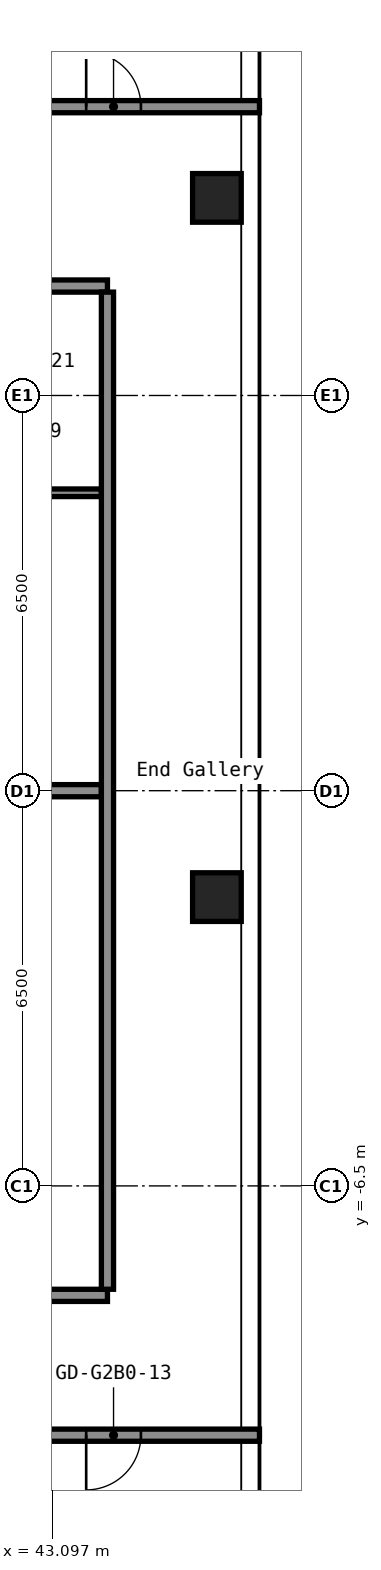
"""IFC4 building model, lengths in metres.
Left out: names, types, materials, properties, quantities, classifications, styles, units other than length and angle.
Written with IfcOpenShell. Run it as: python <this file> out.ifc"""

import sys

from ifc_helpers import new_model, si_unit, direction, frame, frame_2d, origin, origin_2d, place, context, subcontext, project, spatial, rectangle, hollow_rectangle, extrude, element, fill, save


model = new_model("IFC4")
c1 = context("Model", 3, precision=1e-05, world=origin(), true_north=direction((0.0, 1.0)))
c2 = subcontext(c1, "Body", "Model", "MODEL_VIEW")
j1 = project(units=[si_unit("LENGTHUNIT", "METRE"), si_unit("PLANEANGLEUNIT", "RADIAN")], contexts=[c1])
p1 = place(None, origin())
s1 = spatial("IfcSite", under=j1, at=p1, CompositionType="ELEMENT")
p2 = place(p1, origin())
s2 = spatial("IfcBuilding", under=s1, at=p2, CompositionType="ELEMENT")
p3 = place(p2, frame((0.0, 0.0, 78.6)))
s3 = spatial("IfcBuildingStorey", under=s2, at=p3, CompositionType="ELEMENT", Elevation=78.6)
for number, where, z_axis, x_axis in (
    (1, (45.8, -1.75, 0.0), (0.0, 0.0, 1.0), (1.0, 0.0, 0.0)),
    (2, (45.8, 9.75, 0.0), (0.0, 0.0, 1.0), (1.0, 0.0, 0.0)),
):
    element("IfcColumn", number, at=place(p3, frame(where, z_axis=z_axis, x_axis=x_axis)), inside=s3, PredefinedType="COLUMN", context=c2, shape_type="SweptSolid", body=[
        extrude(hollow_rectangle(XDim=0.8, YDim=0.8, WallThickness=0.032, at=origin_2d()), origin(), (0.0, 0.0, 1.0), 2.8),
    ])
p4 = place(p3, frame((16.8, -10.6, 0.0), z_axis=(0.0, 0.0, 1.0), x_axis=(1.0, 0.0, 0.0)))
e3 = element("IfcWall", 3, at=p4, inside=s3, PredefinedType="PARTITIONING", context=c2, shape_type="SweptSolid", body=[
    extrude(rectangle(XDim=29.7, YDim=0.2, at=frame_2d((14.85, 0.0))), origin(), (0.0, 0.0, 1.0), 2.8),
])
p5 = place(p4, frame((2.155, 0.0, 0.0)))
e4 = element("IfcOpeningElement", 4, at=p5, cuts=e3, PredefinedType="OPENING", context=c2, shape_type="SweptSolid", body=[
    extrude(rectangle(XDim=0.9, YDim=2.1, at=frame_2d((0.45, 1.05))), frame((0.0, 0.11, 0.0), z_axis=(0.0, -1.0, 0.0), x_axis=(1.0, 0.0, 0.0)), (0.0, 0.0, 1.0), 0.22),
])
p6 = place(p4, frame((6.355, 0.0, 0.0)))
e5 = element("IfcOpeningElement", 5, at=p6, cuts=e3, PredefinedType="OPENING", context=c2, shape_type="SweptSolid", body=[
    extrude(rectangle(XDim=0.9, YDim=2.1, at=frame_2d((0.45, 1.05))), frame((0.0, 0.11, 0.0), z_axis=(0.0, -1.0, 0.0), x_axis=(1.0, 0.0, 0.0)), (0.0, 0.0, 1.0), 0.22),
])
p7 = place(p4, frame((10.385, 0.0, 0.0)))
e6 = element("IfcOpeningElement", 6, at=p7, cuts=e3, PredefinedType="OPENING", context=c2, shape_type="SweptSolid", body=[
    extrude(rectangle(XDim=0.9, YDim=2.1, at=frame_2d((0.45, 1.05))), frame((0.0, 0.11, 0.0), z_axis=(0.0, -1.0, 0.0), x_axis=(1.0, 0.0, 0.0)), (0.0, 0.0, 1.0), 0.22),
])
p8 = place(p4, frame((14.585, 0.0, 0.0)))
e7 = element("IfcOpeningElement", 7, at=p8, cuts=e3, PredefinedType="OPENING", context=c2, shape_type="SweptSolid", body=[
    extrude(rectangle(XDim=0.9, YDim=2.1, at=frame_2d((0.45, 1.05))), frame((0.0, 0.11, 0.0), z_axis=(0.0, -1.0, 0.0), x_axis=(1.0, 0.0, 0.0)), (0.0, 0.0, 1.0), 0.22),
])
p9 = place(p4, frame((18.7, 0.0, 0.0)))
e8 = element("IfcOpeningElement", 8, at=p9, cuts=e3, PredefinedType="OPENING", context=c2, shape_type="SweptSolid", body=[
    extrude(rectangle(XDim=0.9, YDim=2.1, at=frame_2d((0.45, 1.05))), frame((0.0, 0.11, 0.0), z_axis=(0.0, -1.0, 0.0), x_axis=(1.0, 0.0, 0.0)), (0.0, 0.0, 1.0), 0.22),
])
p10 = place(p4, frame((22.9, 0.0, 0.0)))
e9 = element("IfcOpeningElement", 9, at=p10, cuts=e3, PredefinedType="OPENING", context=c2, shape_type="SweptSolid", body=[
    extrude(rectangle(XDim=0.9, YDim=2.1, at=frame_2d((0.45, 1.05))), frame((0.0, 0.11, 0.0), z_axis=(0.0, -1.0, 0.0), x_axis=(1.0, 0.0, 0.0)), (0.0, 0.0, 1.0), 0.22),
])
p11 = place(p4, frame((26.85, 0.0, 0.0)))
e10 = element("IfcOpeningElement", 10, at=p11, cuts=e3, PredefinedType="OPENING", context=c2, shape_type="SweptSolid", body=[
    extrude(rectangle(XDim=0.9, YDim=2.1, at=frame_2d((0.45, 1.05))), frame((0.0, 0.11, 0.0), z_axis=(0.0, -1.0, 0.0), x_axis=(1.0, 0.0, 0.0)), (0.0, 0.0, 1.0), 0.22),
])
p12 = place(p3, frame((33.6, -8.3, 0.0), z_axis=(0.0, 0.0, 1.0), x_axis=(1.0, 0.0, 0.0)))
e11 = element("IfcWall", 11, at=p12, inside=s3, PredefinedType="PARTITIONING", context=c2, shape_type="SweptSolid", body=[
    extrude(rectangle(XDim=10.4, YDim=0.2, at=frame_2d((5.2, 0.0))), origin(), (0.0, 0.0, 1.0), 2.8),
])
p13 = place(p12, frame((6.35, 0.0, 0.0)))
e12 = element("IfcOpeningElement", 12, at=p13, cuts=e11, PredefinedType="OPENING", context=c2, shape_type="SweptSolid", body=[
    extrude(rectangle(XDim=1.0, YDim=2.1, at=frame_2d((0.5, 1.05))), frame((0.0, 0.11, 0.0), z_axis=(0.0, -1.0, 0.0), x_axis=(1.0, 0.0, 0.0)), (0.0, 0.0, 1.0), 0.22),
])
p14 = place(p3, frame((33.6, 0.0, 0.0), z_axis=(0.0, 0.0, 1.0), x_axis=(1.0, 0.0, 0.0)))
e13 = element("IfcWall", 13, at=p14, inside=s3, PredefinedType="PARTITIONING", context=c2, shape_type="SweptSolid", body=[
    extrude(rectangle(XDim=10.3, YDim=0.2, at=frame_2d((5.15, 0.0))), origin(), (0.0, 0.0, 1.0), 2.8),
])
p15 = place(p3, frame((40.663, 4.9, 0.0), z_axis=(0.0, 0.0, 1.0), x_axis=(1.0, 0.0, 0.0)))
e14 = element("IfcWall", 14, at=p15, inside=s3, PredefinedType="PARTITIONING", context=c2, shape_type="SweptSolid", body=[
    extrude(rectangle(XDim=3.237, YDim=0.125, at=frame_2d((1.619, 0.0))), origin(), (0.0, 0.0, 1.0), 2.8),
])
p16 = place(p15, frame((1.238, 0.0, 0.0)))
e15 = element("IfcOpeningElement", 15, at=p16, cuts=e14, PredefinedType="OPENING", context=c2, shape_type="SweptSolid", body=[
    extrude(rectangle(XDim=0.8, YDim=2.1, at=frame_2d((0.4, 1.05))), frame((0.0, 0.073, 0.0), z_axis=(0.0, -1.0, 0.0), x_axis=(1.0, 0.0, 0.0)), (0.0, 0.0, 1.0), 0.145),
])
p17 = place(p3, frame((33.6, 8.3, 0.0), z_axis=(0.0, 0.0, 1.0), x_axis=(1.0, 0.0, 0.0)))
e16 = element("IfcWall", 16, at=p17, inside=s3, PredefinedType="PARTITIONING", context=c2, shape_type="SweptSolid", body=[
    extrude(rectangle(XDim=10.4, YDim=0.2, at=frame_2d((5.2, 0.0))), origin(), (0.0, 0.0, 1.0), 2.8),
])
p18 = place(p17, frame((3.05, 0.0, 0.0)))
e17 = element("IfcOpeningElement", 17, at=p18, cuts=e16, PredefinedType="OPENING", context=c2, shape_type="SweptSolid", body=[
    extrude(rectangle(XDim=1.0, YDim=2.1, at=frame_2d((0.5, 1.05))), frame((0.0, 0.11, 0.0), z_axis=(0.0, -1.0, 0.0), x_axis=(1.0, 0.0, 0.0)), (0.0, 0.0, 1.0), 0.22),
])
p19 = place(p3, frame((16.8, 11.25, 0.0), z_axis=(0.0, 0.0, 1.0), x_axis=(1.0, 0.0, 0.0)))
e18 = element("IfcWall", 18, at=p19, inside=s3, PredefinedType="PARTITIONING", context=c2, shape_type="SweptSolid", body=[
    extrude(rectangle(XDim=29.7, YDim=0.2, at=frame_2d((14.85, 0.0))), origin(), (0.0, 0.0, 1.0), 2.8),
])
p20 = place(p19, frame((3.4, 0.0, 0.0)))
e19 = element("IfcOpeningElement", 19, at=p20, cuts=e18, PredefinedType="OPENING", context=c2, shape_type="SweptSolid", body=[
    extrude(rectangle(XDim=1.6, YDim=2.1, at=frame_2d((0.8, 1.05))), frame((0.0, 0.11, 0.0), z_axis=(0.0, -1.0, 0.0), x_axis=(1.0, 0.0, 0.0)), (0.0, 0.0, 1.0), 0.22),
])
p21 = place(p19, frame((11.8, 0.0, 0.0)))
e20 = element("IfcOpeningElement", 20, at=p21, cuts=e18, PredefinedType="OPENING", context=c2, shape_type="SweptSolid", body=[
    extrude(rectangle(XDim=1.6, YDim=2.1, at=frame_2d((0.8, 1.05))), frame((0.0, 0.11, 0.0), z_axis=(0.0, -1.0, 0.0), x_axis=(1.0, 0.0, 0.0)), (0.0, 0.0, 1.0), 0.22),
])
p22 = place(p19, frame((20.2, 0.0, 0.0)))
e21 = element("IfcOpeningElement", 21, at=p22, cuts=e18, PredefinedType="OPENING", context=c2, shape_type="SweptSolid", body=[
    extrude(rectangle(XDim=1.6, YDim=2.1, at=frame_2d((0.8, 1.05))), frame((0.0, 0.11, 0.0), z_axis=(0.0, -1.0, 0.0), x_axis=(1.0, 0.0, 0.0)), (0.0, 0.0, 1.0), 0.22),
])
p23 = place(p19, frame((26.85, 0.0, 0.0)))
e22 = element("IfcOpeningElement", 22, at=p23, cuts=e18, PredefinedType="OPENING", context=c2, shape_type="SweptSolid", body=[
    extrude(rectangle(XDim=0.9, YDim=2.1, at=frame_2d((0.45, 1.05))), frame((0.0, 0.11, 0.0), z_axis=(0.0, -1.0, 0.0), x_axis=(1.0, 0.0, 0.0)), (0.0, 0.0, 1.0), 0.22),
])
p24 = place(p3, frame((44.0, -8.2, 0.0), z_axis=(0.0, 0.0, 1.0), x_axis=(0.0, 1.0, 0.0)))
e23 = element("IfcWall", 23, at=p24, inside=s3, PredefinedType="PARTITIONING", context=c2, shape_type="SweptSolid", body=[
    extrude(rectangle(XDim=16.4, YDim=0.2, at=frame_2d((8.2, 0.0))), origin(), (0.0, 0.0, 1.0), 2.8),
])
p25 = place(p11, origin())
e24 = element("IfcDoor", 24, at=p25, inside=s3, OperationType="SINGLE_SWING_LEFT", PredefinedType="DOOR", context=c2, shape_type="SweptSolid", body=[
    extrude(rectangle(XDim=0.9, YDim=2.1, at=frame_2d((0.45, 1.05))), frame((0.0, 0.025, 0.0), z_axis=(0.0, -1.0, 0.0), x_axis=(1.0, 0.0, 0.0)), (0.0, 0.0, 1.0), 0.05),
])
fill(e10, e24)
p26 = place(p23, origin())
e25 = element("IfcDoor", 25, at=p26, inside=s3, OperationType="SINGLE_SWING_RIGHT", PredefinedType="DOOR", context=c2, shape_type="SweptSolid", body=[
    extrude(rectangle(XDim=0.9, YDim=2.1, at=frame_2d((0.45, 1.05))), frame((0.0, 0.025, 0.0), z_axis=(0.0, -1.0, 0.0), x_axis=(1.0, 0.0, 0.0)), (0.0, 0.0, 1.0), 0.05),
])
fill(e22, e25)
save(model, sys.argv[1])
